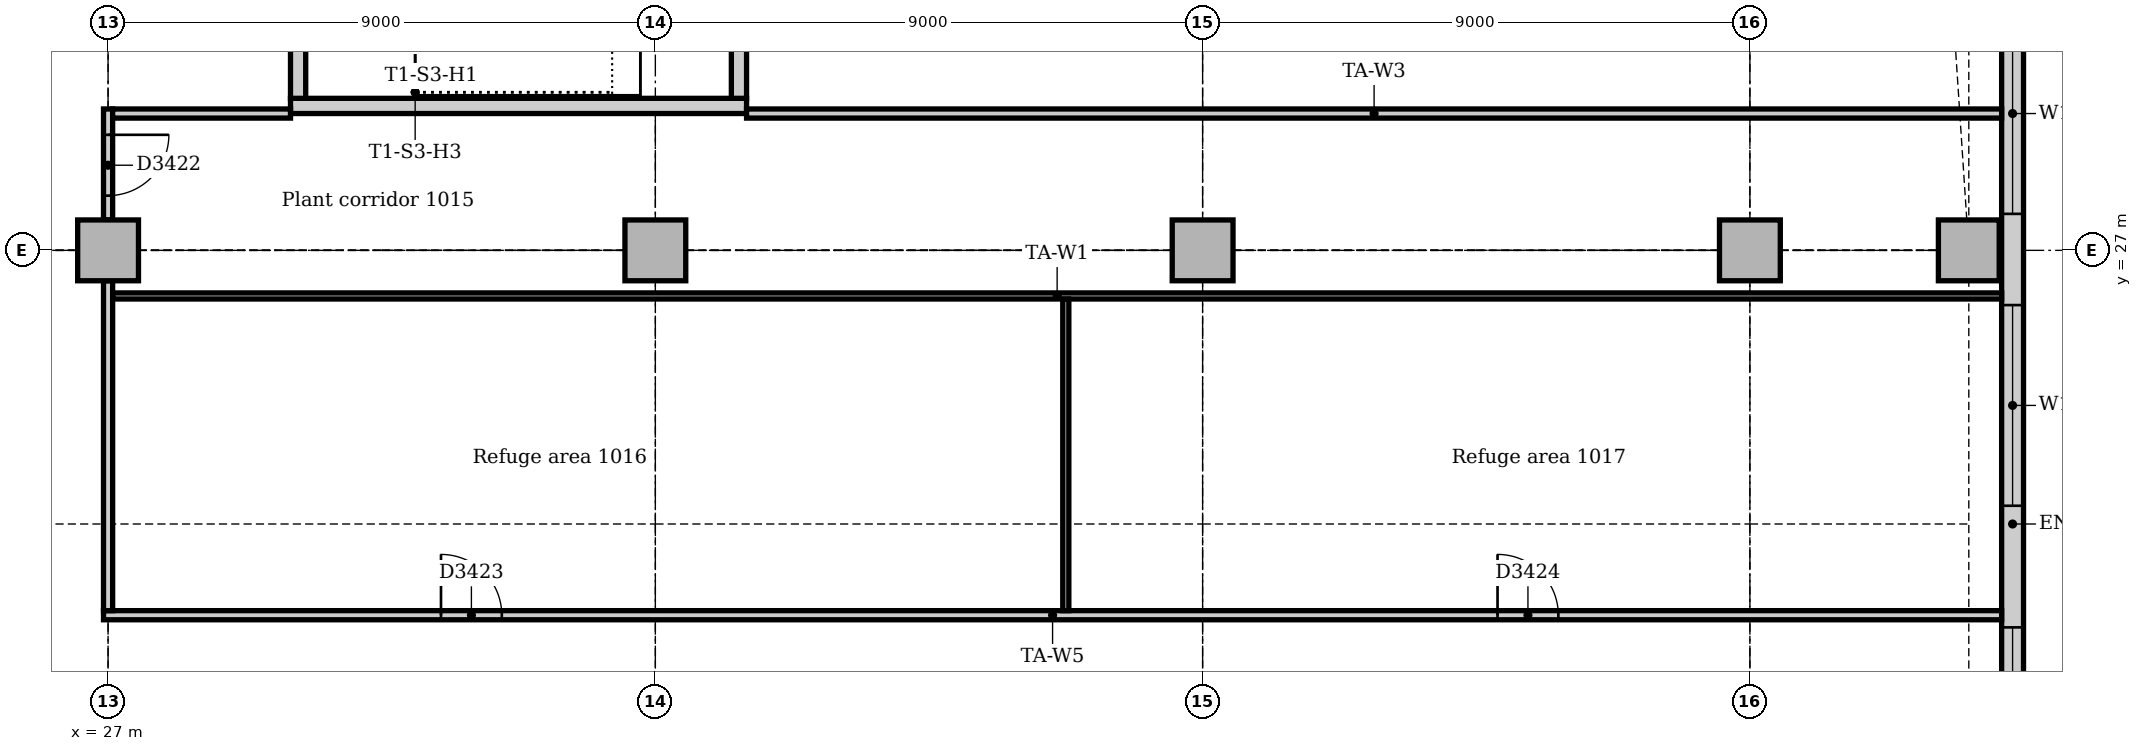
"""IFC4 building model, lengths in metres.
Left out: names, types, materials, properties, quantities, classifications, styles, units other than length and angle.
Written with IfcOpenShell. Run it as: python <this file> out.ifc"""

import sys

from ifc_helpers import new_model, si_unit, direction, frame, frame_2d, origin, origin_2d, place, context, subcontext, project, spatial, rectangle, extrude, element, fill, save


model = new_model("IFC4")
c1 = context("Model", 3, precision=1e-05, world=origin(), true_north=direction((0.0, 1.0)))
c2 = subcontext(c1, "Body", "Model", "MODEL_VIEW")
j1 = project(units=[si_unit("LENGTHUNIT", "METRE"), si_unit("PLANEANGLEUNIT", "RADIAN")], contexts=[c1])
p1 = place(None, origin())
s1 = spatial("IfcSite", under=j1, at=p1, CompositionType="ELEMENT")
p2 = place(p1, origin())
s2 = spatial("IfcBuilding", under=s1, at=p2, CompositionType="ELEMENT")
p3 = place(p2, frame((0.0, 0.0, 46.0)))
s3 = spatial("IfcBuildingStorey", under=s2, at=p3, CompositionType="ELEMENT", Elevation=46.0)
p4 = place(p3, frame((30.0, 29.375, 0.0), z_axis=(0.0, 0.0, 1.0), x_axis=(1.0, 0.0, 0.0)))
e1 = element("IfcWall", 1, at=p4, inside=s3, PredefinedType="SOLIDWALL", context=c2, shape_type="SweptSolid", body=[
    extrude(rectangle(XDim=7.5, YDim=0.25, at=frame_2d((3.75, 0.0))), origin(), (0.0, 0.0, 1.0), 5.0),
])
p5 = place(p3, frame((37.375, 29.5, 0.0), z_axis=(0.0, 0.0, 1.0), x_axis=(0.0, 1.0, 0.0)))
e2 = element("IfcWall", 2, at=p5, inside=s3, PredefinedType="SOLIDWALL", context=c2, shape_type="SweptSolid", body=[
    extrude(rectangle(XDim=4.0, YDim=0.25, at=frame_2d((2.0, 0.0))), origin(), (0.0, 0.0, 1.0), 5.0),
])
p6 = place(p3, frame((30.125, 33.5, 0.0), z_axis=(0.0, 0.0, 1.0), x_axis=(0.0, -1.0, 0.0)))
e3 = element("IfcWall", 3, at=p6, inside=s3, PredefinedType="SOLIDWALL", context=c2, shape_type="SweptSolid", body=[
    extrude(rectangle(XDim=4.0, YDim=0.25, at=frame_2d((2.0, 0.0))), origin(), (0.0, 0.0, 1.0), 5.0),
])
p7 = place(p6, frame((1.5, 0.0, 0.0)))
e4 = element("IfcOpeningElement", 4, at=p7, cuts=e3, PredefinedType="OPENING", context=c2, shape_type="SweptSolid", body=[
    extrude(rectangle(XDim=1.0, YDim=2.1, at=frame_2d((0.5, 1.05))), frame((0.0, 0.135, 0.0), z_axis=(0.0, -1.0, 0.0), x_axis=(1.0, 0.0, 0.0)), (0.0, 0.0, 1.0), 0.27),
])
for number, where, z_axis, x_axis in (
    (5, (57.6, 27.0, 0.0), (0.0, 0.0, 1.0), (1.0, 0.0, 0.0)),
    (6, (27.0, 27.0, 0.0), (0.0, 0.0, 1.0), (1.0, 0.0, 0.0)),
    (7, (36.0, 27.0, 0.0), (0.0, 0.0, 1.0), (1.0, 0.0, 0.0)),
    (8, (45.0, 27.0, 0.0), (0.0, 0.0, 1.0), (1.0, 0.0, 0.0)),
    (9, (54.0, 27.0, 0.0), (0.0, 0.0, 1.0), (1.0, 0.0, 0.0)),
):
    element("IfcColumn", number, at=place(p3, frame(where, z_axis=z_axis, x_axis=x_axis)), inside=s3, PredefinedType="COLUMN", context=c2, shape_type="SweptSolid", body=[
        extrude(rectangle(XDim=1.0, YDim=1.0, at=origin_2d()), origin(), (0.0, 0.0, 1.0), 4.85),
    ])
p8 = place(p3, frame((58.32, 10.243, 0.0), z_axis=(0.0, 0.0, 1.0), x_axis=(0.0, 1.0, 0.0)))
e10 = element("IfcWall", 10, at=p8, inside=s3, PredefinedType="STANDARD", context=c2, shape_type="SweptSolid", body=[
    extrude(rectangle(XDim=24.515, YDim=0.36, at=frame_2d((12.257, 0.0))), origin(), (0.0, 0.0, 1.0), 4.85),
])
p9 = place(p8, frame((3.857, 0.0, 0.9)))
e11 = element("IfcOpeningElement", 11, at=p9, cuts=e10, PredefinedType="OPENING", context=c2, shape_type="SweptSolid", body=[
    extrude(rectangle(XDim=3.3, YDim=2.2, at=frame_2d((1.65, 1.1))), frame((0.0, 0.19, 0.0), z_axis=(0.0, -1.0, 0.0), x_axis=(1.0, 0.0, 0.0)), (0.0, 0.0, 1.0), 0.38),
])
p10 = place(p8, frame((8.757, 0.0, 0.9)))
e12 = element("IfcOpeningElement", 12, at=p10, cuts=e10, PredefinedType="OPENING", context=c2, shape_type="SweptSolid", body=[
    extrude(rectangle(XDim=1.8, YDim=2.2, at=frame_2d((0.9, 1.1))), frame((0.0, 0.19, 0.0), z_axis=(0.0, -1.0, 0.0), x_axis=(1.0, 0.0, 0.0)), (0.0, 0.0, 1.0), 0.38),
])
p11 = place(p8, frame((12.557, 0.0, 0.9)))
e13 = element("IfcOpeningElement", 13, at=p11, cuts=e10, PredefinedType="OPENING", context=c2, shape_type="SweptSolid", body=[
    extrude(rectangle(XDim=3.3, YDim=2.2, at=frame_2d((1.65, 1.1))), frame((0.0, 0.19, 0.0), z_axis=(0.0, -1.0, 0.0), x_axis=(1.0, 0.0, 0.0)), (0.0, 0.0, 1.0), 0.38),
])
p12 = place(p8, frame((17.357, 0.0, 0.9)))
e14 = element("IfcOpeningElement", 14, at=p12, cuts=e10, PredefinedType="OPENING", context=c2, shape_type="SweptSolid", body=[
    extrude(rectangle(XDim=3.3, YDim=2.2, at=frame_2d((1.65, 1.1))), frame((0.0, 0.19, 0.0), z_axis=(0.0, -1.0, 0.0), x_axis=(1.0, 0.0, 0.0)), (0.0, 0.0, 1.0), 0.38),
])
p13 = place(p3, frame((26.925, 21.0, 0.0), z_axis=(0.0, 0.0, 1.0), x_axis=(1.0, 0.0, 0.0)))
e15 = element("IfcWall", 15, at=p13, inside=s3, PredefinedType="PARTITIONING", context=c2, shape_type="SweptSolid", body=[
    extrude(rectangle(XDim=31.215, YDim=0.15, at=frame_2d((15.607, 0.0))), origin(), (0.0, 0.0, 1.0), 4.85),
])
p14 = place(p13, frame((5.55, 0.0, 0.0)))
e16 = element("IfcOpeningElement", 16, at=p14, cuts=e15, PredefinedType="OPENING", context=c2, shape_type="SweptSolid", body=[
    extrude(rectangle(XDim=1.0, YDim=2.1, at=frame_2d((0.5, 1.05))), frame((0.0, 0.085, 0.0), z_axis=(0.0, -1.0, 0.0), x_axis=(1.0, 0.0, 0.0)), (0.0, 0.0, 1.0), 0.17),
])
p15 = place(p13, frame((22.925, 0.0, 0.0)))
e17 = element("IfcOpeningElement", 17, at=p15, cuts=e15, PredefinedType="OPENING", context=c2, shape_type="SweptSolid", body=[
    extrude(rectangle(XDim=1.0, YDim=2.1, at=frame_2d((0.5, 1.05))), frame((0.0, 0.085, 0.0), z_axis=(0.0, -1.0, 0.0), x_axis=(1.0, 0.0, 0.0)), (0.0, 0.0, 1.0), 0.17),
])
p16 = place(p3, frame((27.0, 21.075, 0.0), z_axis=(0.0, 0.0, 1.0), x_axis=(0.0, 1.0, 0.0)))
e18 = element("IfcWall", 18, at=p16, inside=s3, PredefinedType="PARTITIONING", context=c2, shape_type="SweptSolid", body=[
    extrude(rectangle(XDim=5.425, YDim=0.15, at=frame_2d((2.712, 0.0))), origin(), (0.0, 0.0, 1.0), 4.158),
])
p17 = place(p3, frame((27.0, 27.5, 0.0), z_axis=(0.0, 0.0, 1.0), x_axis=(0.0, 1.0, 0.0)))
e19 = element("IfcWall", 19, at=p17, inside=s3, PredefinedType="PARTITIONING", context=c2, shape_type="SweptSolid", body=[
    extrude(rectangle(XDim=1.825, YDim=0.15, at=frame_2d((0.912, 0.0))), origin(), (0.0, 0.0, 1.0), 4.158),
])
p18 = place(p17, frame((0.4, 0.0, 0.0)))
e20 = element("IfcOpeningElement", 20, at=p18, cuts=e19, PredefinedType="OPENING", context=c2, shape_type="SweptSolid", body=[
    extrude(rectangle(XDim=1.0, YDim=2.1, at=frame_2d((0.5, 1.05))), frame((0.0, 0.085, 0.0), z_axis=(0.0, -1.0, 0.0), x_axis=(1.0, 0.0, 0.0)), (0.0, 0.0, 1.0), 0.17),
])
p19 = place(p3, frame((27.075, 29.25, 0.0), z_axis=(0.0, 0.0, 1.0), x_axis=(1.0, 0.0, 0.0)))
e21 = element("IfcWall", 21, at=p19, inside=s3, PredefinedType="PARTITIONING", context=c2, shape_type="SweptSolid", body=[
    extrude(rectangle(XDim=2.925, YDim=0.15, at=frame_2d((1.462, 0.0))), origin(), (0.0, 0.0, 1.0), 4.85),
])
p20 = place(p3, frame((37.5, 29.25, 0.0), z_axis=(0.0, 0.0, 1.0), x_axis=(1.0, 0.0, 0.0)))
e22 = element("IfcWall", 22, at=p20, inside=s3, PredefinedType="PARTITIONING", context=c2, shape_type="SweptSolid", body=[
    extrude(rectangle(XDim=20.64, YDim=0.15, at=frame_2d((10.32, 0.0))), origin(), (0.0, 0.0, 1.0), 4.85),
])
p21 = place(p3, frame((27.075, 26.25, 0.0), z_axis=(0.0, 0.0, 1.0), x_axis=(1.0, 0.0, 0.0)))
e23 = element("IfcWall", 23, at=p21, inside=s3, PredefinedType="PARTITIONING", context=c2, shape_type="SweptSolid", body=[
    extrude(rectangle(XDim=31.065, YDim=0.1, at=frame_2d((15.533, 0.0))), origin(), (0.0, 0.0, 1.0), 4.85),
])
p22 = place(p3, frame((42.75, 21.075, 0.0), z_axis=(0.0, 0.0, 1.0), x_axis=(0.0, 1.0, 0.0)))
e24 = element("IfcWall", 24, at=p22, inside=s3, PredefinedType="PARTITIONING", context=c2, shape_type="SweptSolid", body=[
    extrude(rectangle(XDim=5.125, YDim=0.1, at=frame_2d((2.562, 0.0))), origin(), (0.0, 0.0, 1.0), 4.85),
])
p23 = place(p10, origin())
e25 = element("IfcWindow", 25, at=p23, inside=s3, PartitioningType="SINGLE_PANEL", PredefinedType="WINDOW", context=c2, shape_type="SweptSolid", body=[
    extrude(rectangle(XDim=1.8, YDim=2.2, at=frame_2d((0.9, 1.1))), frame((0.0, 0.13, 0.0), z_axis=(0.0, -1.0, 0.0), x_axis=(1.0, 0.0, 0.0)), (0.0, 0.0, 1.0), 0.06),
])
fill(e12, e25)
p24 = place(p11, origin())
e26 = element("IfcWindow", 26, at=p24, inside=s3, PartitioningType="SINGLE_PANEL", PredefinedType="WINDOW", context=c2, shape_type="SweptSolid", body=[
    extrude(rectangle(XDim=3.3, YDim=2.2, at=frame_2d((1.65, 1.1))), frame((0.0, 0.13, 0.0), z_axis=(0.0, -1.0, 0.0), x_axis=(1.0, 0.0, 0.0)), (0.0, 0.0, 1.0), 0.06),
])
fill(e13, e26)
p25 = place(p12, origin())
e27 = element("IfcWindow", 27, at=p25, inside=s3, PartitioningType="SINGLE_PANEL", PredefinedType="WINDOW", context=c2, shape_type="SweptSolid", body=[
    extrude(rectangle(XDim=3.3, YDim=2.2, at=frame_2d((1.65, 1.1))), frame((0.0, 0.13, 0.0), z_axis=(0.0, -1.0, 0.0), x_axis=(1.0, 0.0, 0.0)), (0.0, 0.0, 1.0), 0.06),
])
fill(e14, e27)
p26 = place(p18, frame((1.0, 0.0, 0.0), z_axis=(0.0, 0.0, 1.0), x_axis=(-1.0, 0.0, 0.0)))
e28 = element("IfcDoor", 28, at=p26, inside=s3, OperationType="SINGLE_SWING_LEFT", PredefinedType="DOOR", context=c2, shape_type="SweptSolid", body=[
    extrude(rectangle(XDim=1.0, YDim=2.1, at=frame_2d((0.5, 1.05))), frame((0.0, 0.025, 0.0), z_axis=(0.0, -1.0, 0.0), x_axis=(1.0, 0.0, 0.0)), (0.0, 0.0, 1.0), 0.05),
])
fill(e20, e28)
p27 = place(p14, origin())
e29 = element("IfcDoor", 29, at=p27, inside=s3, OperationType="SINGLE_SWING_LEFT", PredefinedType="DOOR", context=c2, shape_type="SweptSolid", body=[
    extrude(rectangle(XDim=1.0, YDim=2.1, at=frame_2d((0.5, 1.05))), frame((0.0, 0.025, 0.0), z_axis=(0.0, -1.0, 0.0), x_axis=(1.0, 0.0, 0.0)), (0.0, 0.0, 1.0), 0.05),
])
fill(e16, e29)
p28 = place(p15, origin())
e30 = element("IfcDoor", 30, at=p28, inside=s3, OperationType="SINGLE_SWING_LEFT", PredefinedType="DOOR", context=c2, shape_type="SweptSolid", body=[
    extrude(rectangle(XDim=1.0, YDim=2.1, at=frame_2d((0.5, 1.05))), frame((0.0, 0.025, 0.0), z_axis=(0.0, -1.0, 0.0), x_axis=(1.0, 0.0, 0.0)), (0.0, 0.0, 1.0), 0.05),
])
fill(e17, e30)
save(model, sys.argv[1])
